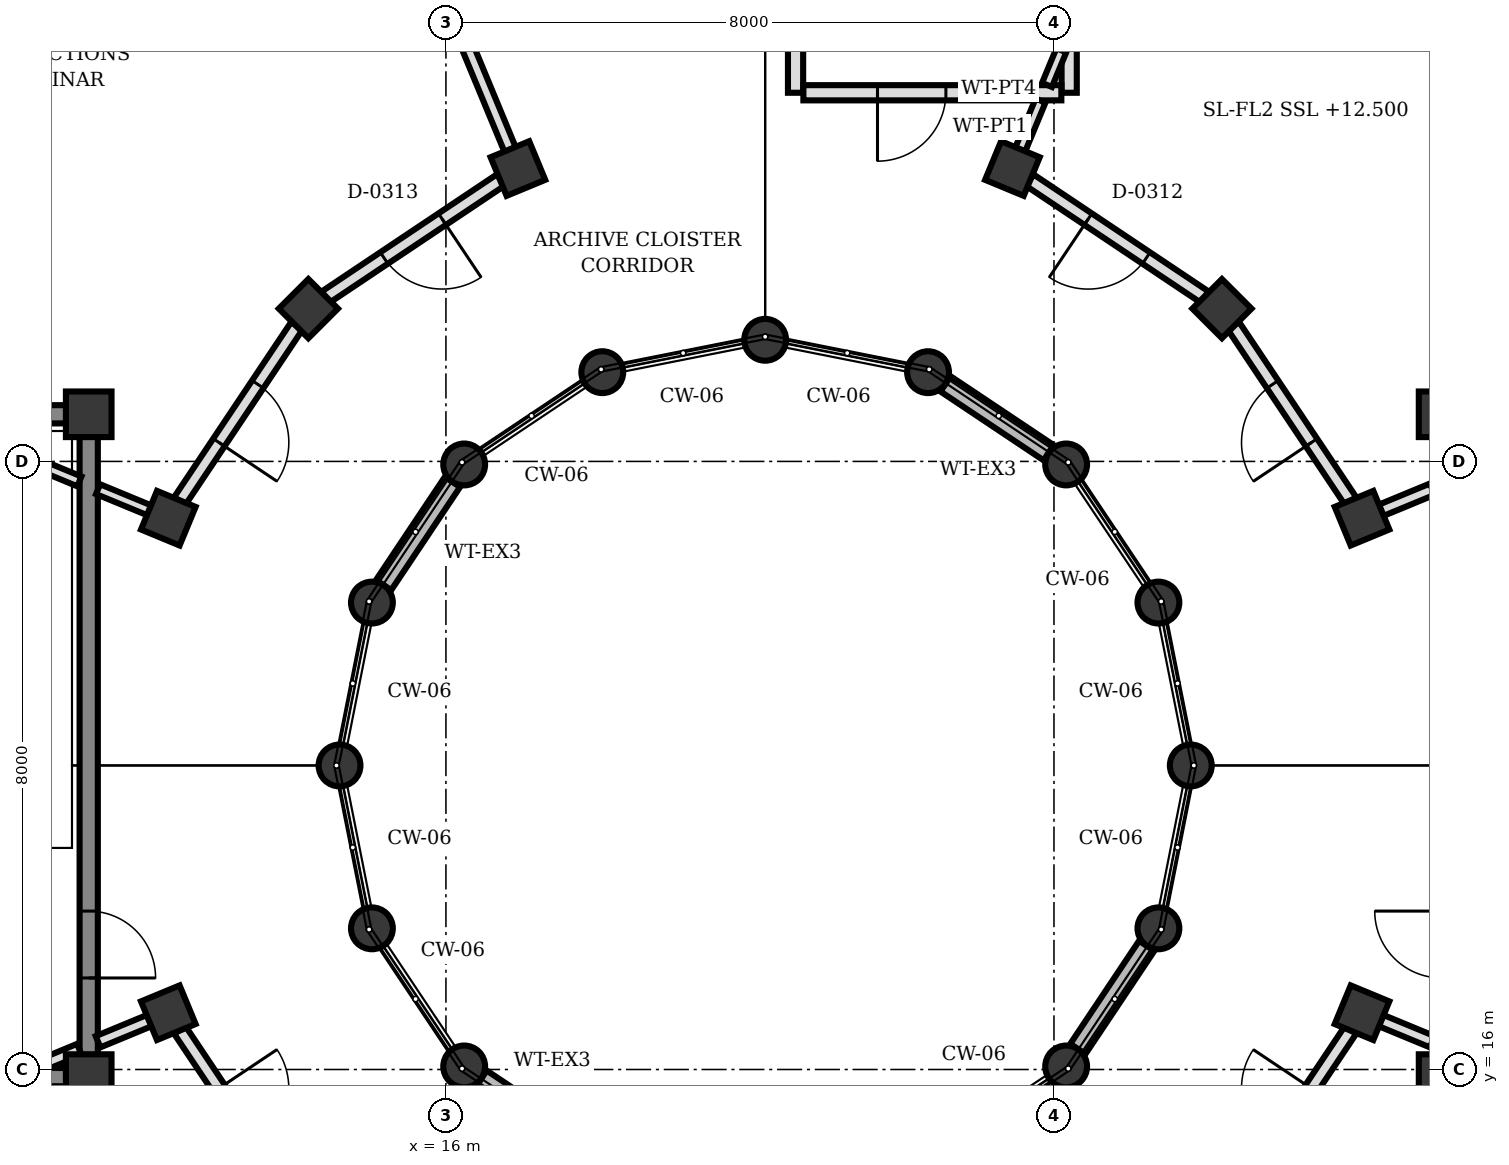
"""IFC4 building model, lengths in metres.
Left out: names, types, materials, properties, quantities, classifications, styles, units other than length and angle.
Written with IfcOpenShell. Run it as: python <this file> out.ifc"""

import sys

from ifc_helpers import new_model, si_unit, direction, frame, frame_2d, origin, origin_2d, place, context, subcontext, project, spatial, rectangle, circle, extrude, element, fill, save


model = new_model("IFC4")
c1 = context("Model", 3, precision=1e-05, world=origin(), true_north=direction((0.0, 1.0)))
c2 = subcontext(c1, "Body", "Model", "MODEL_VIEW")
j1 = project(units=[si_unit("LENGTHUNIT", "METRE"), si_unit("PLANEANGLEUNIT", "RADIAN")], contexts=[c1])
p1 = place(None, origin())
s1 = spatial("IfcSite", under=j1, at=p1, CompositionType="ELEMENT")
p2 = place(p1, origin())
s2 = spatial("IfcBuilding", under=s1, at=p2, CompositionType="ELEMENT")
p3 = place(p2, frame((0.0, 0.0, 12.5)))
s3 = spatial("IfcBuildingStorey", under=s2, at=p3, CompositionType="ELEMENT", Elevation=12.5)
for number, where, z_axis, x_axis in (
    (1, (11.3, 15.9, 0.0), (0.0, 0.0, 1.0), (1.0, 0.0, 0.0)),
    (2, (11.3, 24.62, 0.0), (0.0, 0.0, 1.0), (1.0, 0.0, 0.0)),
    (3, (29.1, 15.9, 0.0), (0.0, 0.0, 1.0), (1.0, 0.0, 0.0)),
    (4, (29.1, 24.62, 0.0), (0.0, 0.0, 1.0), (1.0, 0.0, 0.0)),
):
    element("IfcColumn", number, at=place(p3, frame(where, z_axis=z_axis, x_axis=x_axis)), inside=s3, PredefinedType="COLUMN", context=c2, shape_type="SweptSolid", body=[
        extrude(rectangle(XDim=0.6, YDim=0.6, at=origin_2d()), origin(), (0.0, 0.0, 1.0), 4.0),
    ])
for number, where, z_axis, x_axis in (
    (5, (25.8, 20.0, 0.0), (0.0, 0.0, 1.0), (1.0, 0.0, 0.0)),
    (6, (25.374, 22.143, 0.0), (0.0, 0.0, 1.0), (1.0, 0.0, 0.0)),
    (7, (24.16, 23.96, 0.0), (0.0, 0.0, 1.0), (1.0, 0.0, 0.0)),
    (8, (22.343, 25.174, 0.0), (0.0, 0.0, 1.0), (1.0, 0.0, 0.0)),
    (9, (20.2, 25.6, 0.0), (0.0, 0.0, 1.0), (1.0, 0.0, 0.0)),
    (10, (18.057, 25.174, 0.0), (0.0, 0.0, 1.0), (1.0, 0.0, 0.0)),
    (11, (16.24, 23.96, 0.0), (0.0, 0.0, 1.0), (1.0, 0.0, 0.0)),
    (12, (15.026, 22.143, 0.0), (0.0, 0.0, 1.0), (1.0, 0.0, 0.0)),
    (13, (14.6, 20.0, 0.0), (0.0, 0.0, 1.0), (1.0, 0.0, 0.0)),
    (14, (15.026, 17.857, 0.0), (0.0, 0.0, 1.0), (1.0, 0.0, 0.0)),
    (15, (16.24, 16.04, 0.0), (0.0, 0.0, 1.0), (1.0, 0.0, 0.0)),
    (16, (24.16, 16.04, 0.0), (0.0, 0.0, 1.0), (1.0, 0.0, 0.0)),
    (17, (25.374, 17.857, 0.0), (0.0, 0.0, 1.0), (1.0, 0.0, 0.0)),
):
    element("IfcColumn", number, at=place(p3, frame(where, z_axis=z_axis, x_axis=x_axis)), inside=s3, PredefinedType="COLUMN", context=c2, shape_type="SweptSolid", body=[
        extrude(circle(Radius=0.275, at=origin_2d()), origin(), (0.0, 0.0, 1.0), 3.865),
    ])
for number, where, z_axis, x_axis in (
    (18, (28.053, 23.253, 0.0), (0.0, 0.0, 1.0), (0.924, 0.383, 0.0)),
    (19, (26.21, 26.01, 0.0), (0.0, 0.0, 1.0), (0.707, 0.707, 0.0)),
    (20, (23.453, 27.853, 0.0), (0.0, 0.0, 1.0), (0.383, 0.924, 0.0)),
    (21, (16.947, 27.853, 0.0), (0.0, 0.0, 1.0), (-0.383, 0.924, 0.0)),
    (22, (14.19, 26.01, 0.0), (0.0, 0.0, 1.0), (-0.707, 0.707, 0.0)),
    (23, (12.347, 23.253, 0.0), (0.0, 0.0, 1.0), (-0.924, 0.383, 0.0)),
    (24, (12.347, 16.747, 0.0), (0.0, 0.0, 1.0), (-0.924, -0.383, 0.0)),
    (25, (28.053, 16.747, 0.0), (0.0, 0.0, 1.0), (0.924, -0.383, 0.0)),
):
    element("IfcColumn", number, at=place(p3, frame(where, z_axis=z_axis, x_axis=x_axis)), inside=s3, PredefinedType="COLUMN", context=c2, shape_type="SweptSolid", body=[
        extrude(rectangle(XDim=0.55, YDim=0.55, at=origin_2d()), origin(), (0.0, 0.0, 1.0), 4.59),
    ])
for number, where, z_axis, x_axis in (
    (26, (23.93, 24.114, 0.0), (0.0, 0.0, 1.0), (-0.832, 0.555, 0.0)),
    (27, (16.086, 23.73, 0.0), (0.0, 0.0, 1.0), (-0.555, -0.832, 0.0)),
    (28, (16.47, 15.886, 0.0), (0.0, 0.0, 1.0), (0.832, -0.555, 0.0)),
    (29, (24.314, 16.27, 0.0), (0.0, 0.0, 1.0), (0.555, 0.832, 0.0)),
):
    element("IfcWall", number, at=place(p3, frame(where, z_axis=z_axis, x_axis=x_axis)), inside=s3, PredefinedType="SOLIDWALL", context=c2, shape_type="SweptSolid", body=[
        extrude(rectangle(XDim=1.632, YDim=0.24, at=frame_2d((0.816, 0.0))), origin(), (0.0, 0.0, 1.0), 3.375),
    ])
p4 = place(p3, frame((11.3, 24.328, 0.0), z_axis=(0.0, 0.0, 1.0), x_axis=(0.0, -1.0, 0.0)))
e30 = element("IfcWall", 30, at=p4, inside=s3, PredefinedType="SHEAR", context=c2, shape_type="SweptSolid", body=[
    extrude(rectangle(XDim=8.136, YDim=0.24, at=frame_2d((4.068, 0.0))), origin(), (0.0, 0.0, 1.0), 3.74),
])
p5 = place(p4, frame((6.244, 0.0, 0.0)))
e31 = element("IfcOpeningElement", 31, at=p5, cuts=e30, PredefinedType="OPENING", context=c2, shape_type="SweptSolid", body=[
    extrude(rectangle(XDim=0.88, YDim=2.1, at=frame_2d((0.44, 1.05))), frame((0.0, 0.13, 0.0), z_axis=(0.0, -1.0, 0.0), x_axis=(1.0, 0.0, 0.0)), (0.0, 0.0, 1.0), 0.26),
])
for number, where, z_axis, x_axis in (
    (32, (11.008, 15.9, 0.0), (0.0, 0.0, 1.0), (-1.0, 0.0, 0.0)),
    (33, (11.008, 24.62, 0.0), (0.0, 0.0, 1.0), (-1.0, 0.0, 0.0)),
):
    element("IfcWall", number, at=place(p3, frame(where, z_axis=z_axis, x_axis=x_axis)), inside=s3, PredefinedType="SHEAR", context=c2, shape_type="SweptSolid", body=[
        extrude(rectangle(XDim=4.216, YDim=0.24, at=frame_2d((2.108, 0.0))), origin(), (0.0, 0.0, 1.0), 3.74),
    ])
p6 = place(p3, frame((20.6, 28.85, 0.0), z_axis=(0.0, 0.0, 1.0), x_axis=(0.0, 1.0, 0.0)))
e34 = element("IfcWall", 34, at=p6, inside=s3, PredefinedType="PARTITIONING", context=c2, shape_type="SweptSolid", body=[
    extrude(rectangle(XDim=3.283, YDim=0.2, at=frame_2d((1.642, 0.0))), origin(), (0.0, 0.0, 1.0), 3.7),
])
p7 = place(p3, frame((24.2, 28.85, 0.0), z_axis=(0.0, 0.0, 1.0), x_axis=(0.0, 1.0, 0.0)))
e35 = element("IfcWall", 35, at=p7, inside=s3, PredefinedType="PARTITIONING", context=c2, shape_type="SweptSolid", body=[
    extrude(rectangle(XDim=3.447, YDim=0.2, at=frame_2d((1.724, 0.0))), origin(), (0.0, 0.0, 1.0), 3.7),
])
p8 = place(p3, frame((24.097, 28.85, 0.0), z_axis=(0.0, 0.0, 1.0), x_axis=(-1.0, 0.0, 0.0)))
e36 = element("IfcWall", 36, at=p8, inside=s3, PredefinedType="PARTITIONING", context=c2, shape_type="SweptSolid", body=[
    extrude(rectangle(XDim=3.394, YDim=0.2, at=frame_2d((1.697, 0.0))), origin(), (0.0, 0.0, 1.0), 3.7),
])
p9 = place(p8, frame((1.519, 0.0, 0.0)))
e37 = element("IfcOpeningElement", 37, at=p9, cuts=e36, PredefinedType="OPENING", context=c2, shape_type="SweptSolid", body=[
    extrude(rectangle(XDim=0.9, YDim=2.2, at=frame_2d((0.45, 1.1))), frame((0.0, 0.11, 0.0), z_axis=(0.0, -1.0, 0.0), x_axis=(1.0, 0.0, 0.0)), (0.0, 0.0, 1.0), 0.22),
])
p10 = place(p3, frame((28.3, 23.355, 0.0), z_axis=(0.0, 0.0, 1.0), x_axis=(0.924069600435, 0.382224245113, 0.0)))
e38 = element("IfcWall", 38, at=p10, inside=s3, PredefinedType="PARTITIONING", context=c2, shape_type="SweptSolid", body=[
    extrude(rectangle(XDim=0.733, YDim=0.16, at=frame_2d((0.366, 0.0))), origin(), (0.0, 0.0, 1.0), 3.7),
])
p11 = place(p3, frame((23.555, 28.1, 0.0), z_axis=(0.0, 0.0, 1.0), x_axis=(0.38278283439, 0.923838352579, 0.0)))
e39 = element("IfcWall", 39, at=p11, inside=s3, PredefinedType="PARTITIONING", context=c2, shape_type="SweptSolid", body=[
    extrude(rectangle(XDim=0.7, YDim=0.14, at=frame_2d((0.35, 0.0))), origin(), (0.0, 0.0, 1.0), 3.7),
])
p12 = place(p3, frame((23.908, 28.953, 0.0), z_axis=(0.0, 0.0, 1.0), x_axis=(0.3827885685, 0.92383597669, 0.0)))
e40 = element("IfcWall", 40, at=p12, inside=s3, PredefinedType="PARTITIONING", context=c2, shape_type="SweptSolid", body=[
    extrude(rectangle(XDim=0.494, YDim=0.14, at=frame_2d((0.247, 0.0))), origin(), (0.0, 0.0, 1.0), 3.7),
])
p13 = place(p3, frame((16.845, 28.1, 0.0), z_axis=(0.0, 0.0, 1.0), x_axis=(-0.382683896966, 0.923879340067, 0.0)))
e41 = element("IfcWall", 41, at=p13, inside=s3, PredefinedType="PARTITIONING", context=c2, shape_type="SweptSolid", body=[
    extrude(rectangle(XDim=8.44, YDim=0.16, at=frame_2d((4.22, 0.0))), origin(), (0.0, 0.0, 1.0), 3.7),
])
p14 = place(p3, frame((12.1, 23.355, 0.0), z_axis=(0.0, 0.0, 1.0), x_axis=(-0.924069600435, 0.382224245113, 0.0)))
e42 = element("IfcWall", 42, at=p14, inside=s3, PredefinedType="PARTITIONING", context=c2, shape_type="SweptSolid", body=[
    extrude(rectangle(XDim=0.733, YDim=0.14, at=frame_2d((0.366, 0.0))), origin(), (0.0, 0.0, 1.0), 3.7),
])
p15 = place(p3, frame((11.177, 23.737, 0.0), z_axis=(0.0, 0.0, 1.0), x_axis=(-0.923817443679, 0.382833293686, 0.0)))
e43 = element("IfcWall", 43, at=p15, inside=s3, PredefinedType="PARTITIONING", context=c2, shape_type="SweptSolid", body=[
    extrude(rectangle(XDim=1.985, YDim=0.14, at=frame_2d((0.993, 0.0))), origin(), (0.0, 0.0, 1.0), 3.7),
])
p16 = place(p3, frame((12.1, 16.645, 0.0), z_axis=(0.0, 0.0, 1.0), x_axis=(-0.924069600435, -0.382224245113, 0.0)))
e44 = element("IfcWall", 44, at=p16, inside=s3, PredefinedType="PARTITIONING", context=c2, shape_type="SweptSolid", body=[
    extrude(rectangle(XDim=0.733, YDim=0.16, at=frame_2d((0.366, 0.0))), origin(), (0.0, 0.0, 1.0), 3.7),
])
p17 = place(p3, frame((11.177, 16.263, 0.0), z_axis=(0.0, 0.0, 1.0), x_axis=(-0.923812676193, -0.382844797933, 0.0)))
e45 = element("IfcWall", 45, at=p17, inside=s3, PredefinedType="PARTITIONING", context=c2, shape_type="SweptSolid", body=[
    extrude(rectangle(XDim=0.627, YDim=0.16, at=frame_2d((0.313, 0.0))), origin(), (0.0, 0.0, 1.0), 3.7),
])
p18 = place(p3, frame((28.3, 16.645, 0.0), z_axis=(0.0, 0.0, 1.0), x_axis=(0.924069600435, -0.382224245113, 0.0)))
e46 = element("IfcWall", 46, at=p18, inside=s3, PredefinedType="PARTITIONING", context=c2, shape_type="SweptSolid", body=[
    extrude(rectangle(XDim=0.733, YDim=0.16, at=frame_2d((0.366, 0.0))), origin(), (0.0, 0.0, 1.0), 3.7),
])
p19 = place(p3, frame((27.902, 23.479, 0.0), z_axis=(0.0, 0.0, 1.0), x_axis=(-0.555797002478, 0.831318045056, 0.0)))
e47 = element("IfcWall", 47, at=p19, inside=s3, PredefinedType="PARTITIONING", context=c2, shape_type="SweptSolid", body=[
    extrude(rectangle(XDim=2.773, YDim=0.18, at=frame_2d((1.386, 0.0))), origin(), (0.0, 0.0, 1.0), 3.7),
])
p20 = place(p19, frame((0.926, 0.0, 0.0)))
e48 = element("IfcOpeningElement", 48, at=p20, cuts=e47, PredefinedType="OPENING", context=c2, shape_type="SweptSolid", body=[
    extrude(rectangle(XDim=0.92, YDim=2.1, at=frame_2d((0.46, 1.05))), frame((0.0, 0.1, 0.0), z_axis=(0.0, -1.0, 0.0), x_axis=(1.0, 0.0, 0.0)), (0.0, 0.0, 1.0), 0.2),
])
p21 = place(p3, frame((25.984, 26.161, 0.0), z_axis=(0.0, 0.0, 1.0), x_axis=(-0.831318045056, 0.555797002478, 0.0)))
e49 = element("IfcWall", 49, at=p21, inside=s3, PredefinedType="PARTITIONING", context=c2, shape_type="SweptSolid", body=[
    extrude(rectangle(XDim=2.773, YDim=0.18, at=frame_2d((1.386, 0.0))), origin(), (0.0, 0.0, 1.0), 3.7),
])
p22 = place(p21, frame((0.926, 0.0, 0.0)))
e50 = element("IfcOpeningElement", 50, at=p22, cuts=e49, PredefinedType="OPENING", context=c2, shape_type="SweptSolid", body=[
    extrude(rectangle(XDim=0.92, YDim=2.1, at=frame_2d((0.46, 1.05))), frame((0.0, 0.1, 0.0), z_axis=(0.0, -1.0, 0.0), x_axis=(1.0, 0.0, 0.0)), (0.0, 0.0, 1.0), 0.2),
])
p23 = place(p3, frame((16.721, 27.702, 0.0), z_axis=(0.0, 0.0, 1.0), x_axis=(-0.831318045056, -0.555797002478, 0.0)))
e51 = element("IfcWall", 51, at=p23, inside=s3, PredefinedType="PARTITIONING", context=c2, shape_type="SweptSolid", body=[
    extrude(rectangle(XDim=2.773, YDim=0.18, at=frame_2d((1.386, 0.0))), origin(), (0.0, 0.0, 1.0), 3.7),
])
p24 = place(p23, frame((0.926, 0.0, 0.0)))
e52 = element("IfcOpeningElement", 52, at=p24, cuts=e51, PredefinedType="OPENING", context=c2, shape_type="SweptSolid", body=[
    extrude(rectangle(XDim=0.92, YDim=2.1, at=frame_2d((0.46, 1.05))), frame((0.0, 0.1, 0.0), z_axis=(0.0, -1.0, 0.0), x_axis=(1.0, 0.0, 0.0)), (0.0, 0.0, 1.0), 0.2),
])
p25 = place(p3, frame((14.039, 25.784, 0.0), z_axis=(0.0, 0.0, 1.0), x_axis=(-0.555797002478, -0.831318045056, 0.0)))
e53 = element("IfcWall", 53, at=p25, inside=s3, PredefinedType="PARTITIONING", context=c2, shape_type="SweptSolid", body=[
    extrude(rectangle(XDim=2.773, YDim=0.18, at=frame_2d((1.386, 0.0))), origin(), (0.0, 0.0, 1.0), 3.7),
])
p26 = place(p25, frame((0.926, 0.0, 0.0)))
e54 = element("IfcOpeningElement", 54, at=p26, cuts=e53, PredefinedType="OPENING", context=c2, shape_type="SweptSolid", body=[
    extrude(rectangle(XDim=0.92, YDim=2.1, at=frame_2d((0.46, 1.05))), frame((0.0, 0.1, 0.0), z_axis=(0.0, -1.0, 0.0), x_axis=(1.0, 0.0, 0.0)), (0.0, 0.0, 1.0), 0.2),
])
p27 = place(p3, frame((12.498, 16.521, 0.0), z_axis=(0.0, 0.0, 1.0), x_axis=(0.555797002478, -0.831318045056, 0.0)))
e55 = element("IfcWall", 55, at=p27, inside=s3, PredefinedType="PARTITIONING", context=c2, shape_type="SweptSolid", body=[
    extrude(rectangle(XDim=2.773, YDim=0.18, at=frame_2d((1.386, 0.0))), origin(), (0.0, 0.0, 1.0), 3.7),
])
p28 = place(p27, frame((0.926, 0.0, 0.0)))
e56 = element("IfcOpeningElement", 56, at=p28, cuts=e55, PredefinedType="OPENING", context=c2, shape_type="SweptSolid", body=[
    extrude(rectangle(XDim=0.92, YDim=2.1, at=frame_2d((0.46, 1.05))), frame((0.0, 0.1, 0.0), z_axis=(0.0, -1.0, 0.0), x_axis=(1.0, 0.0, 0.0)), (0.0, 0.0, 1.0), 0.2),
])
p29 = place(p3, frame((26.361, 14.216, 0.0), z_axis=(0.0, 0.0, 1.0), x_axis=(0.555797002478, 0.831318045056, 0.0)))
e57 = element("IfcWall", 57, at=p29, inside=s3, PredefinedType="PARTITIONING", context=c2, shape_type="SweptSolid", body=[
    extrude(rectangle(XDim=2.773, YDim=0.18, at=frame_2d((1.386, 0.0))), origin(), (0.0, 0.0, 1.0), 3.7),
])
p30 = place(p29, frame((0.926, 0.0, 0.0)))
e58 = element("IfcOpeningElement", 58, at=p30, cuts=e57, PredefinedType="OPENING", context=c2, shape_type="SweptSolid", body=[
    extrude(rectangle(XDim=0.92, YDim=2.1, at=frame_2d((0.46, 1.05))), frame((0.0, 0.1, 0.0), z_axis=(0.0, -1.0, 0.0), x_axis=(1.0, 0.0, 0.0)), (0.0, 0.0, 1.0), 0.2),
])
p31 = place(p5, origin())
e59 = element("IfcDoor", 59, at=p31, inside=s3, OperationType="SINGLE_SWING_RIGHT", PredefinedType="DOOR", context=c2, shape_type="SweptSolid", body=[
    extrude(rectangle(XDim=0.88, YDim=2.1, at=frame_2d((0.44, 1.05))), frame((0.0, 0.025, 0.0), z_axis=(0.0, -1.0, 0.0), x_axis=(1.0, 0.0, 0.0)), (0.0, 0.0, 1.0), 0.05),
])
fill(e31, e59)
p32 = place(p9, origin())
e60 = element("IfcDoor", 60, at=p32, inside=s3, OperationType="SINGLE_SWING_RIGHT", PredefinedType="DOOR", context=c2, shape_type="SweptSolid", body=[
    extrude(rectangle(XDim=0.9, YDim=2.2, at=frame_2d((0.45, 1.1))), frame((0.0, 0.025, 0.0), z_axis=(0.0, -1.0, 0.0), x_axis=(1.0, 0.0, 0.0)), (0.0, 0.0, 1.0), 0.05),
])
fill(e37, e60)
p33 = place(p20, origin())
e61 = element("IfcDoor", 61, at=p33, inside=s3, OperationType="SINGLE_SWING_LEFT", PredefinedType="DOOR", context=c2, shape_type="SweptSolid", body=[
    extrude(rectangle(XDim=0.92, YDim=2.1, at=frame_2d((0.46, 1.05))), frame((0.0, 0.025, 0.0), z_axis=(0.0, -1.0, 0.0), x_axis=(1.0, 0.0, 0.0)), (0.0, 0.0, 1.0), 0.05),
])
fill(e48, e61)
p34 = place(p22, origin())
e62 = element("IfcDoor", 62, at=p34, inside=s3, OperationType="SINGLE_SWING_RIGHT", PredefinedType="DOOR", context=c2, shape_type="SweptSolid", body=[
    extrude(rectangle(XDim=0.92, YDim=2.1, at=frame_2d((0.46, 1.05))), frame((0.0, 0.025, 0.0), z_axis=(0.0, -1.0, 0.0), x_axis=(1.0, 0.0, 0.0)), (0.0, 0.0, 1.0), 0.05),
])
fill(e50, e62)
p35 = place(p24, origin())
e63 = element("IfcDoor", 63, at=p35, inside=s3, OperationType="SINGLE_SWING_LEFT", PredefinedType="DOOR", context=c2, shape_type="SweptSolid", body=[
    extrude(rectangle(XDim=0.92, YDim=2.1, at=frame_2d((0.46, 1.05))), frame((0.0, 0.025, 0.0), z_axis=(0.0, -1.0, 0.0), x_axis=(1.0, 0.0, 0.0)), (0.0, 0.0, 1.0), 0.05),
])
fill(e52, e63)
p36 = place(p26, origin())
e64 = element("IfcDoor", 64, at=p36, inside=s3, OperationType="SINGLE_SWING_RIGHT", PredefinedType="DOOR", context=c2, shape_type="SweptSolid", body=[
    extrude(rectangle(XDim=0.92, YDim=2.1, at=frame_2d((0.46, 1.05))), frame((0.0, 0.025, 0.0), z_axis=(0.0, -1.0, 0.0), x_axis=(1.0, 0.0, 0.0)), (0.0, 0.0, 1.0), 0.05),
])
fill(e54, e64)
save(model, sys.argv[1])
